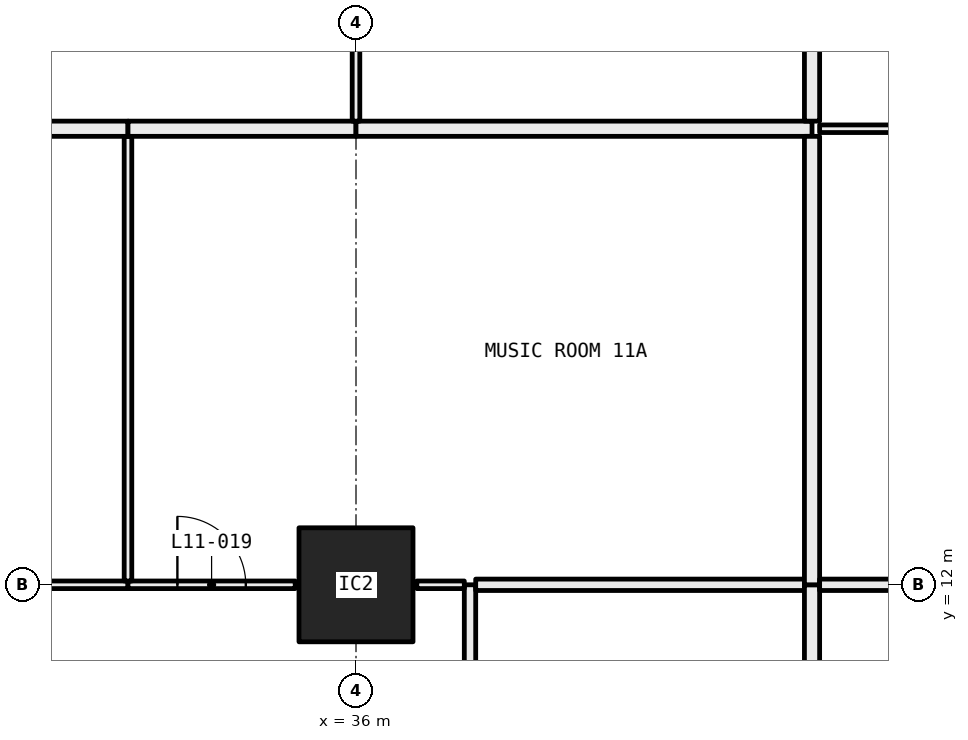
"""IFC4 building model, lengths in metres.
Left out: names, types, materials, properties, quantities, classifications, styles, units other than length and angle.
Written with IfcOpenShell. Run it as: python <this file> out.ifc"""

import sys

from ifc_helpers import new_model, si_unit, direction, frame, frame_2d, origin, origin_2d, place, context, subcontext, project, spatial, rectangle, hollow_rectangle, extrude, element, fill, save


model = new_model("IFC4")
c1 = context("Model", 3, precision=1e-05, world=origin(), true_north=direction((0.0, 1.0)))
c2 = subcontext(c1, "Body", "Model", "MODEL_VIEW")
j1 = project(units=[si_unit("LENGTHUNIT", "METRE"), si_unit("PLANEANGLEUNIT", "RADIAN")], contexts=[c1])
p1 = place(None, origin())
s1 = spatial("IfcSite", under=j1, at=p1, CompositionType="ELEMENT")
p2 = place(p1, origin())
s2 = spatial("IfcBuilding", under=s1, at=p2, CompositionType="ELEMENT")
p3 = place(p2, frame((0.0, 0.0, 50.7)))
s3 = spatial("IfcBuildingStorey", under=s2, at=p3, CompositionType="ELEMENT", Elevation=50.7)
p4 = place(p3, frame((36.0, 12.0, 0.0), z_axis=(0.0, 0.0, 1.0), x_axis=(1.0, 0.0, 0.0)))
e1 = element("IfcColumn", 1, at=p4, inside=s3, PredefinedType="COLUMN", context=c2, shape_type="SweptSolid", body=[
    extrude(hollow_rectangle(XDim=1.5, YDim=1.5, WallThickness=0.065, at=origin_2d()), origin(), (0.0, 0.0, 1.0), 3.05),
])
p5 = place(p3, frame((37.5, 9.0, 0.0), z_axis=(0.0, 0.0, 1.0), x_axis=(0.0, 1.0, 0.0)))
e2 = element("IfcWall", 2, at=p5, inside=s3, PredefinedType="PARTITIONING", context=c2, shape_type="SweptSolid", body=[
    extrude(rectangle(XDim=3.0, YDim=0.15, at=frame_2d((1.5, 0.0))), origin(), (0.0, 0.0, 1.0), 2.45),
])
p6 = place(p5, frame((1.05, 0.0, 0.0)))
e3 = element("IfcOpeningElement", 3, at=p6, cuts=e2, PredefinedType="OPENING", context=c2, shape_type="SweptSolid", body=[
    extrude(rectangle(XDim=0.9, YDim=2.1, at=frame_2d((0.45, 1.05))), frame((0.0, 0.085, 0.0), z_axis=(0.0, -1.0, 0.0), x_axis=(1.0, 0.0, 0.0)), (0.0, 0.0, 1.0), 0.17),
])
p7 = place(p3, frame((33.0, 12.0, 0.0), z_axis=(0.0, 0.0, 1.0), x_axis=(-1.0, 0.0, 0.0)))
e4 = element("IfcWall", 4, at=p7, inside=s3, PredefinedType="PARTITIONING", context=c2, shape_type="SweptSolid", body=[
    extrude(rectangle(XDim=4.645, YDim=0.1, at=frame_2d((2.323, 0.0))), origin(), (0.0, 0.0, 1.0), 2.45),
])
p8 = place(p3, frame((35.2, 12.0, 0.0), z_axis=(0.0, 0.0, 1.0), x_axis=(-1.0, 0.0, 0.0)))
e5 = element("IfcWall", 5, at=p8, inside=s3, PredefinedType="PARTITIONING", context=c2, shape_type="SweptSolid", body=[
    extrude(rectangle(XDim=2.2, YDim=0.1, at=frame_2d((1.1, 0.0))), origin(), (0.0, 0.0, 1.0), 2.45),
])
p9 = place(p8, frame((0.65, 0.0, 0.0)))
e6 = element("IfcOpeningElement", 6, at=p9, cuts=e5, PredefinedType="OPENING", context=c2, shape_type="SweptSolid", body=[
    extrude(rectangle(XDim=0.9, YDim=2.1, at=frame_2d((0.45, 1.05))), frame((0.0, 0.06, 0.0), z_axis=(0.0, -1.0, 0.0), x_axis=(1.0, 0.0, 0.0)), (0.0, 0.0, 1.0), 0.12),
])
p10 = place(p3, frame((37.425, 12.0, 0.0), z_axis=(0.0, 0.0, 1.0), x_axis=(-1.0, 0.0, 0.0)))
e7 = element("IfcWall", 7, at=p10, inside=s3, PredefinedType="PARTITIONING", context=c2, shape_type="SweptSolid", body=[
    extrude(rectangle(XDim=0.625, YDim=0.1, at=frame_2d((0.312, 0.0))), origin(), (0.0, 0.0, 1.0), 2.45),
])
p11 = place(p3, frame((41.9, 12.0, 0.0), z_axis=(0.0, 0.0, 1.0), x_axis=(-1.0, 0.0, 0.0)))
e8 = element("IfcWall", 8, at=p11, inside=s3, PredefinedType="PARTITIONING", context=c2, shape_type="SweptSolid", body=[
    extrude(rectangle(XDim=4.325, YDim=0.15, at=frame_2d((2.163, 0.0))), origin(), (0.0, 0.0, 1.0), 2.45),
])
p12 = place(p3, frame((42.0, 9.0, 0.0), z_axis=(0.0, 0.0, 1.0), x_axis=(0.0, 1.0, 0.0)))
e9 = element("IfcWall", 9, at=p12, inside=s3, PredefinedType="PARTITIONING", context=c2, shape_type="SweptSolid", body=[
    extrude(rectangle(XDim=3.0, YDim=0.2, at=frame_2d((1.5, 0.0))), origin(), (0.0, 0.0, 1.0), 2.45),
])
p13 = place(p3, frame((33.0, 12.05, 0.0), z_axis=(0.0, 0.0, 1.0), x_axis=(0.0, 1.0, 0.0)))
e10 = element("IfcWall", 10, at=p13, inside=s3, PredefinedType="PARTITIONING", context=c2, shape_type="SweptSolid", body=[
    extrude(rectangle(XDim=5.85, YDim=0.1, at=frame_2d((2.925, 0.0))), origin(), (0.0, 0.0, 1.0), 2.45),
])
p14 = place(p3, frame((33.0, 18.0, 0.0), z_axis=(0.0, 0.0, 1.0), x_axis=(-1.0, 0.0, 0.0)))
e11 = element("IfcWall", 11, at=p14, inside=s3, PredefinedType="PARTITIONING", context=c2, shape_type="SweptSolid", body=[
    extrude(rectangle(XDim=7.1, YDim=0.2, at=frame_2d((3.55, 0.0))), origin(), (0.0, 0.0, 1.0), 3.05),
])
p15 = place(p3, frame((36.0, 18.0, 0.0), z_axis=(0.0, 0.0, 1.0), x_axis=(-1.0, 0.0, 0.0)))
e12 = element("IfcWall", 12, at=p15, inside=s3, PredefinedType="PARTITIONING", context=c2, shape_type="SweptSolid", body=[
    extrude(rectangle(XDim=3.0, YDim=0.2, at=frame_2d((1.5, 0.0))), origin(), (0.0, 0.0, 1.0), 2.45),
])
p16 = place(p3, frame((42.0, 18.0, 0.0), z_axis=(0.0, 0.0, 1.0), x_axis=(-1.0, 0.0, 0.0)))
e13 = element("IfcWall", 13, at=p16, inside=s3, PredefinedType="PARTITIONING", context=c2, shape_type="SweptSolid", body=[
    extrude(rectangle(XDim=6.0, YDim=0.2, at=frame_2d((3.0, 0.0))), origin(), (0.0, 0.0, 1.0), 2.45),
])
p17 = place(p3, frame((42.0, 12.0, 0.0), z_axis=(0.0, 0.0, 1.0), x_axis=(0.0, 1.0, 0.0)))
e14 = element("IfcWall", 14, at=p17, inside=s3, PredefinedType="PARTITIONING", context=c2, shape_type="SweptSolid", body=[
    extrude(rectangle(XDim=5.9, YDim=0.2, at=frame_2d((2.95, 0.0))), origin(), (0.0, 0.0, 1.0), 2.45),
])
p18 = place(p3, frame((36.0, 18.1, 0.0), z_axis=(0.0, 0.0, 1.0), x_axis=(0.0, 1.0, 0.0)))
e15 = element("IfcWall", 15, at=p18, inside=s3, PredefinedType="PARTITIONING", context=c2, shape_type="SweptSolid", body=[
    extrude(rectangle(XDim=5.1, YDim=0.1, at=frame_2d((2.55, 0.0))), origin(), (0.0, 0.0, 1.0), 2.45),
])
p19 = place(p18, frame((2.1, 0.0, 0.0)))
e16 = element("IfcOpeningElement", 16, at=p19, cuts=e15, PredefinedType="OPENING", context=c2, shape_type="SweptSolid", body=[
    extrude(rectangle(XDim=0.9, YDim=2.1, at=frame_2d((0.45, 1.05))), frame((0.0, 0.06, 0.0), z_axis=(0.0, -1.0, 0.0), x_axis=(1.0, 0.0, 0.0)), (0.0, 0.0, 1.0), 0.12),
])
p20 = place(p3, frame((42.0, 18.1, 0.0), z_axis=(0.0, 0.0, 1.0), x_axis=(0.0, 1.0, 0.0)))
e17 = element("IfcWall", 17, at=p20, inside=s3, PredefinedType="PARTITIONING", context=c2, shape_type="SweptSolid", body=[
    extrude(rectangle(XDim=6.2, YDim=0.2, at=frame_2d((3.1, 0.0))), origin(), (0.0, 0.0, 1.0), 2.45),
])
p21 = place(p3, frame((46.425, 12.0, 0.0), z_axis=(0.0, 0.0, 1.0), x_axis=(-1.0, 0.0, 0.0)))
e18 = element("IfcWall", 18, at=p21, inside=s3, PredefinedType="PARTITIONING", context=c2, shape_type="SweptSolid", body=[
    extrude(rectangle(XDim=4.325, YDim=0.15, at=frame_2d((2.163, 0.0))), origin(), (0.0, 0.0, 1.0), 2.45),
])
p22 = place(p3, frame((46.0, 18.0, 0.0), z_axis=(0.0, 0.0, 1.0), x_axis=(-1.0, 0.0, 0.0)))
e19 = element("IfcWall", 19, at=p22, inside=s3, PredefinedType="PARTITIONING", context=c2, shape_type="SweptSolid", body=[
    extrude(rectangle(XDim=3.9, YDim=0.1, at=frame_2d((1.95, 0.0))), origin(), (0.0, 0.0, 1.0), 3.05),
])
p23 = place(p22, frame((1.5, 0.0, 0.0)))
e20 = element("IfcOpeningElement", 20, at=p23, cuts=e19, PredefinedType="OPENING", context=c2, shape_type="SweptSolid", body=[
    extrude(rectangle(XDim=0.9, YDim=2.1, at=frame_2d((0.45, 1.05))), frame((0.0, 0.06, 0.0), z_axis=(0.0, -1.0, 0.0), x_axis=(1.0, 0.0, 0.0)), (0.0, 0.0, 1.0), 0.12),
])
p24 = place(p9, frame((0.9, 0.0, 0.0), x_axis=(-1.0, 0.0, 0.0)))
e21 = element("IfcDoor", 21, at=p24, inside=s3, OperationType="SINGLE_SWING_RIGHT", PredefinedType="DOOR", context=c2, shape_type="SweptSolid", body=[
    extrude(rectangle(XDim=0.9, YDim=2.1, at=frame_2d((0.45, 1.05))), frame((0.0, 0.025, 0.0), z_axis=(0.0, -1.0, 0.0), x_axis=(1.0, 0.0, 0.0)), (0.0, 0.0, 1.0), 0.05),
])
fill(e6, e21)
save(model, sys.argv[1])
